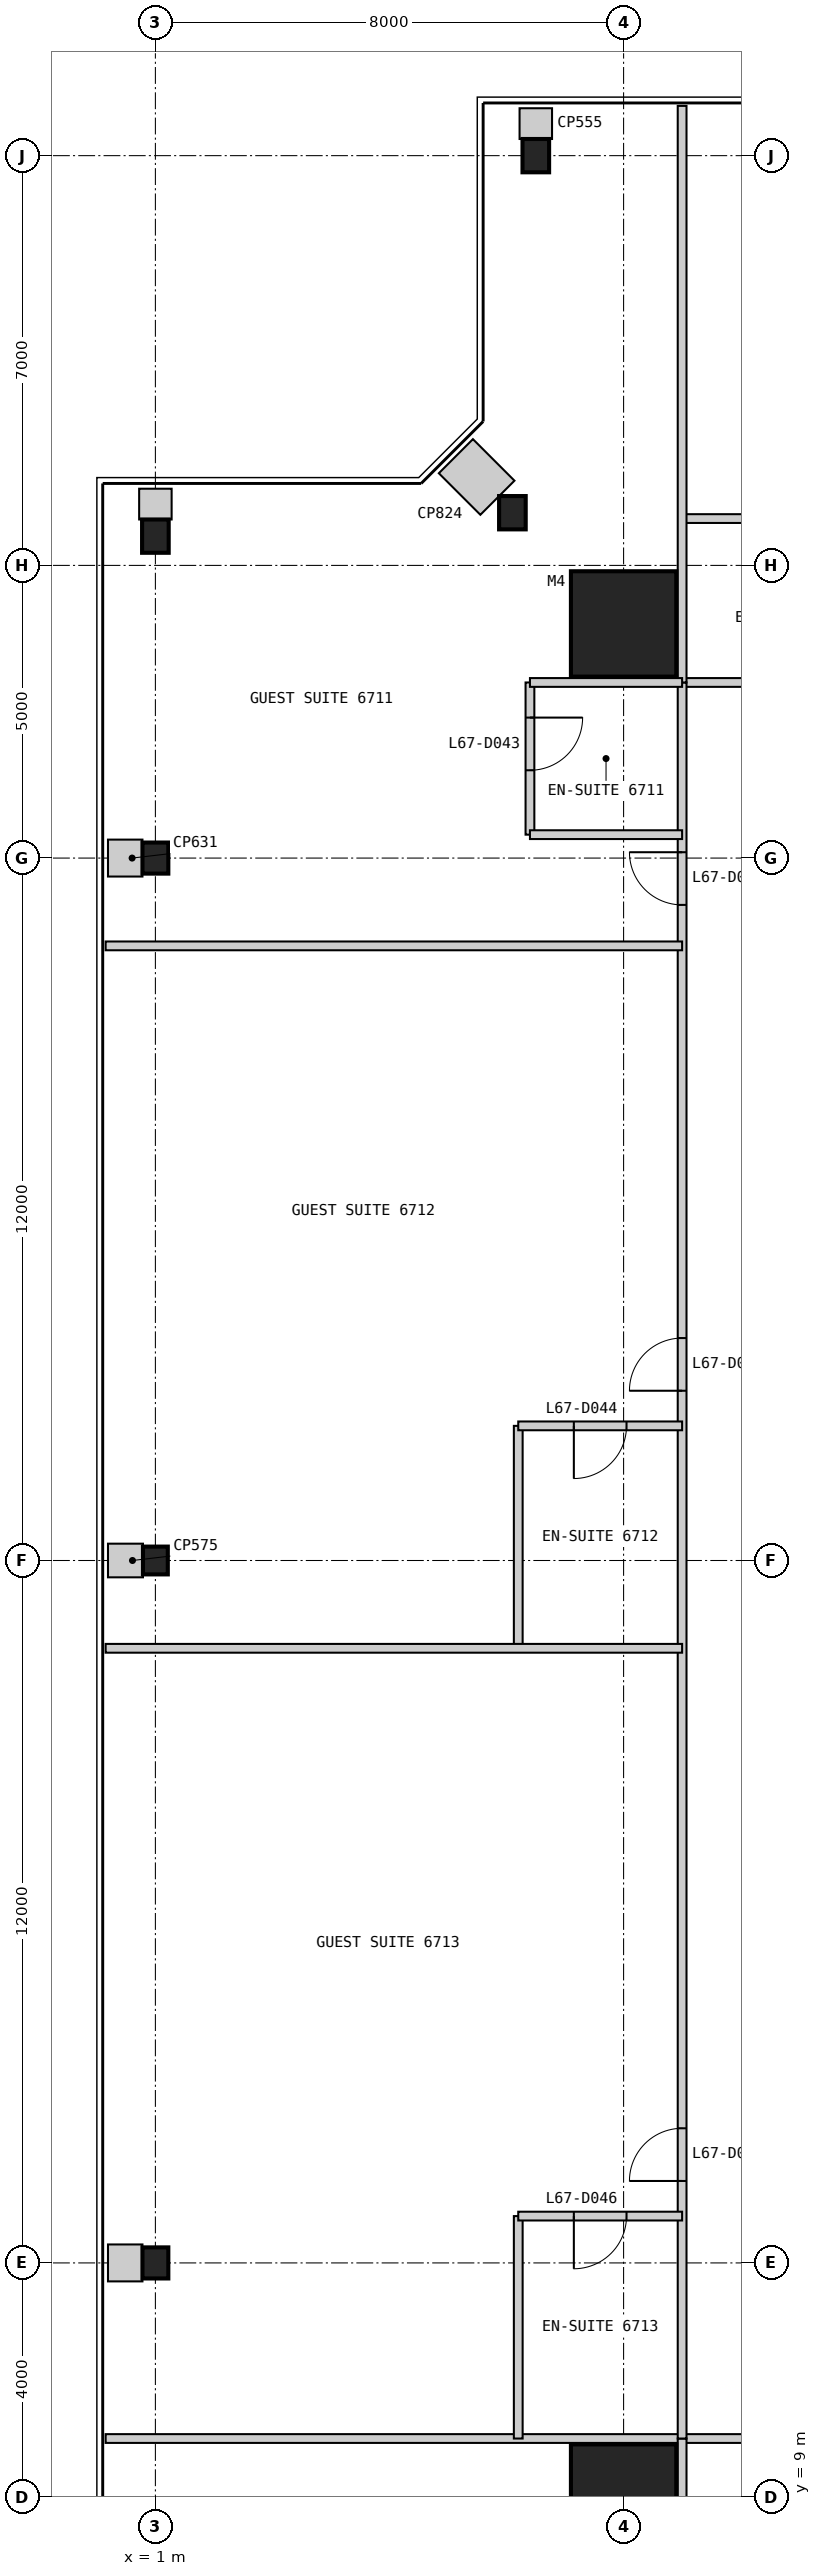
"""IFC4 building model, lengths in metres.
Left out: names, types, materials, properties, quantities, classifications, styles, units other than length and angle.
Written with IfcOpenShell. Run it as: python <this file> out.ifc"""

import sys

from ifc_helpers import new_model, si_unit, direction, frame, frame_2d, origin, origin_2d, place, context, subcontext, project, spatial, rectangle, i_section, extrude, element, fill, save


model = new_model("IFC4")
c1 = context("Model", 3, precision=1e-05, world=origin(), true_north=direction((0.0, 1.0)))
c2 = subcontext(c1, "Body", "Model", "MODEL_VIEW")
j1 = project(units=[si_unit("LENGTHUNIT", "METRE"), si_unit("PLANEANGLEUNIT", "RADIAN")], contexts=[c1])
p1 = place(None, origin())
s1 = spatial("IfcSite", under=j1, at=p1, CompositionType="ELEMENT")
p2 = place(p1, origin())
s2 = spatial("IfcBuilding", under=s1, at=p2, CompositionType="ELEMENT")
p3 = place(p2, frame((0.0, 0.0, 279.8)))
s3 = spatial("IfcBuildingStorey", under=s2, at=p3, CompositionType="ELEMENT", Elevation=279.8)
for number, where, z_axis, x_axis in (
    (1, (9.0, 9.0, 0.0), (0.0, 0.0, 1.0), (1.0, 0.0, 0.0)),
    (2, (9.0, 41.0, 0.0), (0.0, 0.0, 1.0), (1.0, 0.0, 0.0)),
):
    element("IfcColumn", number, at=place(p3, frame(where, z_axis=z_axis, x_axis=x_axis)), inside=s3, PredefinedType="COLUMN", context=c2, shape_type="SweptSolid", body=[
        extrude(rectangle(XDim=1.8, YDim=1.8, at=origin_2d()), origin(), (0.0, 0.0, 1.0), 3.4),
    ])
for number, where, z_axis, x_axis in (
    (3, (7.5, 49.0, 0.0), (0.0, 0.0, 1.0), (1.0, 0.0, 0.0)),
    (4, (7.1, 42.9, 0.0), (0.0, 0.0, 1.0), (1.0, 0.0, 0.0)),
    (5, (1.0, 42.5, 0.0), (0.0, 0.0, 1.0), (1.0, 0.0, 0.0)),
):
    element("IfcColumn", number, at=place(p3, frame(where, z_axis=z_axis, x_axis=x_axis)), inside=s3, PredefinedType="COLUMN", context=c2, shape_type="SweptSolid", body=[
        extrude(i_section(OverallWidth=0.455, OverallDepth=0.569, WebThickness=0.078, FlangeThickness=0.125, at=origin_2d()), origin(), (0.0, 0.0, 1.0), 3.4),
    ])
p4 = place(p3, frame((1.0, 37.0, 0.0), z_axis=(0.0, 0.0, 1.0), x_axis=(1.0, 0.0, 0.0)))
e6 = element("IfcColumn", 6, at=p4, inside=s3, PredefinedType="COLUMN", context=c2, shape_type="SweptSolid", body=[
    extrude(i_section(OverallWidth=0.442, OverallDepth=0.531, WebThickness=0.066, FlangeThickness=0.106, at=origin_2d()), origin(), (0.0, 0.0, 1.0), 3.4),
])
p5 = place(p3, frame((1.0, 25.0, 0.0), z_axis=(0.0, 0.0, 1.0), x_axis=(1.0, 0.0, 0.0)))
e7 = element("IfcColumn", 7, at=p5, inside=s3, PredefinedType="COLUMN", context=c2, shape_type="SweptSolid", body=[
    extrude(i_section(OverallWidth=0.424, OverallDepth=0.475, WebThickness=0.048, FlangeThickness=0.077, at=origin_2d()), origin(), (0.0, 0.0, 1.0), 3.4),
])
p6 = place(p3, frame((1.0, 13.0, 0.0), z_axis=(0.0, 0.0, 1.0), x_axis=(1.0, 0.0, 0.0)))
e8 = element("IfcColumn", 8, at=p6, inside=s3, PredefinedType="COLUMN", context=c2, shape_type="SweptSolid", body=[
    extrude(i_section(OverallWidth=0.442, OverallDepth=0.531, WebThickness=0.066, FlangeThickness=0.106, at=origin_2d()), origin(), (0.0, 0.0, 1.0), 3.4),
])
p7 = place(p3, frame((10.0, 10.0, 0.0), z_axis=(0.0, 0.0, 1.0), x_axis=(1.0, 0.0, 0.0)))
e9 = element("IfcWall", 9, at=p7, inside=s3, PredefinedType="PARTITIONING", context=c2, shape_type="SweptSolid", body=[
    extrude(rectangle(XDim=30.0, YDim=0.15, at=frame_2d((15.0, 0.0))), origin(), (0.0, 0.0, 1.0), 3.25),
])
p8 = place(p7, frame((2.9, 0.0, 0.0)))
e10 = element("IfcOpeningElement", 10, at=p8, cuts=e9, PredefinedType="OPENING", context=c2, shape_type="SweptSolid", body=[
    extrude(rectangle(XDim=0.9, YDim=2.1, at=frame_2d((0.45, 1.05))), frame((0.0, 0.085, 0.0), z_axis=(0.0, -1.0, 0.0), x_axis=(1.0, 0.0, 0.0)), (0.0, 0.0, 1.0), 0.17),
])
p9 = place(p7, frame((11.2, 0.0, 0.0)))
e11 = element("IfcOpeningElement", 11, at=p9, cuts=e9, PredefinedType="OPENING", context=c2, shape_type="SweptSolid", body=[
    extrude(rectangle(XDim=0.9, YDim=2.1, at=frame_2d((0.45, 1.05))), frame((0.0, 0.085, 0.0), z_axis=(0.0, -1.0, 0.0), x_axis=(1.0, 0.0, 0.0)), (0.0, 0.0, 1.0), 0.17),
])
p10 = place(p7, frame((17.6, 0.0, 0.0)))
e12 = element("IfcOpeningElement", 12, at=p10, cuts=e9, PredefinedType="OPENING", context=c2, shape_type="SweptSolid", body=[
    extrude(rectangle(XDim=0.9, YDim=2.1, at=frame_2d((0.45, 1.05))), frame((0.0, 0.085, 0.0), z_axis=(0.0, -1.0, 0.0), x_axis=(1.0, 0.0, 0.0)), (0.0, 0.0, 1.0), 0.17),
])
p11 = place(p7, frame((26.3, 0.0, 0.0)))
e13 = element("IfcOpeningElement", 13, at=p11, cuts=e9, PredefinedType="OPENING", context=c2, shape_type="SweptSolid", body=[
    extrude(rectangle(XDim=1.0, YDim=2.1, at=frame_2d((0.5, 1.05))), frame((0.0, 0.085, 0.0), z_axis=(0.0, -1.0, 0.0), x_axis=(1.0, 0.0, 0.0)), (0.0, 0.0, 1.0), 0.17),
])
p12 = place(p3, frame((0.15, 10.0, 0.0), z_axis=(0.0, 0.0, 1.0), x_axis=(1.0, 0.0, 0.0)))
e14 = element("IfcWall", 14, at=p12, inside=s3, PredefinedType="PARTITIONING", context=c2, shape_type="SweptSolid", body=[
    extrude(rectangle(XDim=9.85, YDim=0.15, at=frame_2d((4.925, 0.0))), origin(), (0.0, 0.0, 1.0), 3.25),
])
p13 = place(p3, frame((10.0, 7.4, 0.0), z_axis=(0.0, 0.0, 1.0), x_axis=(0.0, 1.0, 0.0)))
e15 = element("IfcWall", 15, at=p13, inside=s3, PredefinedType="PARTITIONING", context=c2, shape_type="SweptSolid", body=[
    extrude(rectangle(XDim=2.6, YDim=0.15, at=frame_2d((1.3, 0.0))), origin(), (0.0, 0.0, 1.0), 3.25),
])
p14 = place(p3, frame((40.0, 40.0, 0.0), z_axis=(0.0, 0.0, 1.0), x_axis=(-1.0, 0.0, 0.0)))
e16 = element("IfcWall", 16, at=p14, inside=s3, PredefinedType="PARTITIONING", context=c2, shape_type="SweptSolid", body=[
    extrude(rectangle(XDim=30.0, YDim=0.15, at=frame_2d((15.0, 0.0))), origin(), (0.0, 0.0, 1.0), 3.25),
])
p15 = place(p14, frame((2.9, 0.0, 0.0)))
e17 = element("IfcOpeningElement", 17, at=p15, cuts=e16, PredefinedType="OPENING", context=c2, shape_type="SweptSolid", body=[
    extrude(rectangle(XDim=0.9, YDim=2.1, at=frame_2d((0.45, 1.05))), frame((0.0, 0.085, 0.0), z_axis=(0.0, -1.0, 0.0), x_axis=(1.0, 0.0, 0.0)), (0.0, 0.0, 1.0), 0.17),
])
p16 = place(p14, frame((11.2, 0.0, 0.0)))
e18 = element("IfcOpeningElement", 18, at=p16, cuts=e16, PredefinedType="OPENING", context=c2, shape_type="SweptSolid", body=[
    extrude(rectangle(XDim=0.9, YDim=2.1, at=frame_2d((0.45, 1.05))), frame((0.0, 0.085, 0.0), z_axis=(0.0, -1.0, 0.0), x_axis=(1.0, 0.0, 0.0)), (0.0, 0.0, 1.0), 0.17),
])
p17 = place(p14, frame((24.7, 0.0, 0.0)))
e19 = element("IfcOpeningElement", 19, at=p17, cuts=e16, PredefinedType="OPENING", context=c2, shape_type="SweptSolid", body=[
    extrude(rectangle(XDim=0.9, YDim=2.1, at=frame_2d((0.45, 1.05))), frame((0.0, 0.085, 0.0), z_axis=(0.0, -1.0, 0.0), x_axis=(1.0, 0.0, 0.0)), (0.0, 0.0, 1.0), 0.17),
])
p18 = place(p3, frame((13.8, 42.8, 0.0), z_axis=(0.0, 0.0, 1.0), x_axis=(-1.0, 0.0, 0.0)))
e20 = element("IfcWall", 20, at=p18, inside=s3, PredefinedType="PARTITIONING", context=c2, shape_type="SweptSolid", body=[
    extrude(rectangle(XDim=3.8, YDim=0.15, at=frame_2d((1.9, 0.0))), origin(), (0.0, 0.0, 1.0), 3.25),
])
p19 = place(p3, frame((10.0, 40.0, 0.0), z_axis=(0.0, 0.0, 1.0), x_axis=(0.0, -1.0, 0.0)))
e21 = element("IfcWall", 21, at=p19, inside=s3, PredefinedType="PARTITIONING", context=c2, shape_type="SweptSolid", body=[
    extrude(rectangle(XDim=30.0, YDim=0.15, at=frame_2d((15.0, 0.0))), origin(), (0.0, 0.0, 1.0), 2.638),
])
p20 = place(p19, frame((2.9, 0.0, 0.0)))
e22 = element("IfcOpeningElement", 22, at=p20, cuts=e21, PredefinedType="OPENING", context=c2, shape_type="SweptSolid", body=[
    extrude(rectangle(XDim=0.9, YDim=2.1, at=frame_2d((0.45, 1.05))), frame((0.0, 0.085, 0.0), z_axis=(0.0, -1.0, 0.0), x_axis=(1.0, 0.0, 0.0)), (0.0, 0.0, 1.0), 0.17),
])
p21 = place(p19, frame((11.2, 0.0, 0.0)))
e23 = element("IfcOpeningElement", 23, at=p21, cuts=e21, PredefinedType="OPENING", context=c2, shape_type="SweptSolid", body=[
    extrude(rectangle(XDim=0.9, YDim=2.1, at=frame_2d((0.45, 1.05))), frame((0.0, 0.085, 0.0), z_axis=(0.0, -1.0, 0.0), x_axis=(1.0, 0.0, 0.0)), (0.0, 0.0, 1.0), 0.17),
])
p22 = place(p19, frame((24.7, 0.0, 0.0)))
e24 = element("IfcOpeningElement", 24, at=p22, cuts=e21, PredefinedType="OPENING", context=c2, shape_type="SweptSolid", body=[
    extrude(rectangle(XDim=0.9, YDim=2.1, at=frame_2d((0.45, 1.05))), frame((0.0, 0.085, 0.0), z_axis=(0.0, -1.0, 0.0), x_axis=(1.0, 0.0, 0.0)), (0.0, 0.0, 1.0), 0.17),
])
p23 = place(p3, frame((10.0, 49.85, 0.0), z_axis=(0.0, 0.0, 1.0), x_axis=(0.0, -1.0, 0.0)))
e25 = element("IfcWall", 25, at=p23, inside=s3, PredefinedType="PARTITIONING", context=c2, shape_type="SweptSolid", body=[
    extrude(rectangle(XDim=9.85, YDim=0.15, at=frame_2d((4.925, 0.0))), origin(), (0.0, 0.0, 1.0), 3.25),
])
p24 = place(p3, frame((7.4, 40.0, 0.0), z_axis=(0.0, 0.0, 1.0), x_axis=(0.0, -1.0, 0.0)))
e26 = element("IfcWall", 26, at=p24, inside=s3, PredefinedType="PARTITIONING", context=c2, shape_type="SweptSolid", body=[
    extrude(rectangle(XDim=2.6, YDim=0.15, at=frame_2d((1.3, 0.0))), origin(), (0.0, 0.0, 1.0), 3.25),
])
p25 = place(p24, frame((0.6, 0.0, 0.0)))
e27 = element("IfcOpeningElement", 27, at=p25, cuts=e26, PredefinedType="OPENING", context=c2, shape_type="SweptSolid", body=[
    extrude(rectangle(XDim=0.9, YDim=2.1, at=frame_2d((0.45, 1.05))), frame((0.0, 0.085, 0.0), z_axis=(0.0, -1.0, 0.0), x_axis=(1.0, 0.0, 0.0)), (0.0, 0.0, 1.0), 0.17),
])
for number, where, z_axis, x_axis in (
    (28, (7.4, 40.0, 0.0), (0.0, 0.0, 1.0), (1.0, 0.0, 0.0)),
    (29, (7.4, 37.4, 0.0), (0.0, 0.0, 1.0), (1.0, 0.0, 0.0)),
):
    element("IfcWall", number, at=place(p3, frame(where, z_axis=z_axis, x_axis=x_axis)), inside=s3, PredefinedType="PARTITIONING", context=c2, shape_type="SweptSolid", body=[
        extrude(rectangle(XDim=2.6, YDim=0.15, at=frame_2d((1.3, 0.0))), origin(), (0.0, 0.0, 1.0), 3.25),
    ])
p26 = place(p3, frame((0.15, 35.5, 0.0), z_axis=(0.0, 0.0, 1.0), x_axis=(1.0, 0.0, 0.0)))
e30 = element("IfcWall", 30, at=p26, inside=s3, PredefinedType="PARTITIONING", context=c2, shape_type="SweptSolid", body=[
    extrude(rectangle(XDim=9.85, YDim=0.15, at=frame_2d((4.925, 0.0))), origin(), (0.0, 0.0, 1.0), 3.25),
])
p27 = place(p3, frame((7.2, 27.3, 0.0), z_axis=(0.0, 0.0, 1.0), x_axis=(0.0, -1.0, 0.0)))
e31 = element("IfcWall", 31, at=p27, inside=s3, PredefinedType="PARTITIONING", context=c2, shape_type="SweptSolid", body=[
    extrude(rectangle(XDim=3.8, YDim=0.15, at=frame_2d((1.9, 0.0))), origin(), (0.0, 0.0, 1.0), 3.25),
])
p28 = place(p3, frame((7.2, 27.3, 0.0), z_axis=(0.0, 0.0, 1.0), x_axis=(1.0, 0.0, 0.0)))
e32 = element("IfcWall", 32, at=p28, inside=s3, PredefinedType="PARTITIONING", context=c2, shape_type="SweptSolid", body=[
    extrude(rectangle(XDim=2.8, YDim=0.15, at=frame_2d((1.4, 0.0))), origin(), (0.0, 0.0, 1.0), 3.25),
])
p29 = place(p28, frame((0.95, 0.0, 0.0)))
e33 = element("IfcOpeningElement", 33, at=p29, cuts=e32, PredefinedType="OPENING", context=c2, shape_type="SweptSolid", body=[
    extrude(rectangle(XDim=0.9, YDim=2.1, at=frame_2d((0.45, 1.05))), frame((0.0, 0.085, 0.0), z_axis=(0.0, -1.0, 0.0), x_axis=(1.0, 0.0, 0.0)), (0.0, 0.0, 1.0), 0.17),
])
p30 = place(p3, frame((0.15, 23.5, 0.0), z_axis=(0.0, 0.0, 1.0), x_axis=(1.0, 0.0, 0.0)))
e34 = element("IfcWall", 34, at=p30, inside=s3, PredefinedType="PARTITIONING", context=c2, shape_type="SweptSolid", body=[
    extrude(rectangle(XDim=9.85, YDim=0.15, at=frame_2d((4.925, 0.0))), origin(), (0.0, 0.0, 1.0), 3.25),
])
p31 = place(p3, frame((7.2, 13.8, 0.0), z_axis=(0.0, 0.0, 1.0), x_axis=(0.0, -1.0, 0.0)))
e35 = element("IfcWall", 35, at=p31, inside=s3, PredefinedType="PARTITIONING", context=c2, shape_type="SweptSolid", body=[
    extrude(rectangle(XDim=3.8, YDim=0.15, at=frame_2d((1.9, 0.0))), origin(), (0.0, 0.0, 1.0), 3.25),
])
p32 = place(p3, frame((7.2, 13.8, 0.0), z_axis=(0.0, 0.0, 1.0), x_axis=(1.0, 0.0, 0.0)))
e36 = element("IfcWall", 36, at=p32, inside=s3, PredefinedType="PARTITIONING", context=c2, shape_type="SweptSolid", body=[
    extrude(rectangle(XDim=2.8, YDim=0.15, at=frame_2d((1.4, 0.0))), origin(), (0.0, 0.0, 1.0), 3.25),
])
p33 = place(p32, frame((0.95, 0.0, 0.0)))
e37 = element("IfcOpeningElement", 37, at=p33, cuts=e36, PredefinedType="OPENING", context=c2, shape_type="SweptSolid", body=[
    extrude(rectangle(XDim=0.9, YDim=2.1, at=frame_2d((0.45, 1.05))), frame((0.0, 0.085, 0.0), z_axis=(0.0, -1.0, 0.0), x_axis=(1.0, 0.0, 0.0)), (0.0, 0.0, 1.0), 0.17),
])
p34 = place(p3, frame((7.5, 49.81, 0.0), z_axis=(0.0, 0.0, 1.0), x_axis=(0.0, -1.0, 0.0)))
e38 = element("IfcWall", 38, at=p34, inside=s3, PredefinedType="PARTITIONING", context=c2, shape_type="SweptSolid", body=[
    extrude(rectangle(XDim=0.526, YDim=0.555, at=frame_2d((0.263, 0.0))), origin(), (0.0, 0.0, 1.0), 3.25),
])
p35 = place(p3, frame((6.134, 43.866, 0.0), z_axis=(0.0, 0.0, 1.0), x_axis=(0.707106781187, -0.707106781187, 0.0)))
e39 = element("IfcWall", 39, at=p35, inside=s3, PredefinedType="PARTITIONING", context=c2, shape_type="SweptSolid", body=[
    extrude(rectangle(XDim=1.004, YDim=0.824, at=frame_2d((0.502, 0.0))), origin(), (0.0, 0.0, 1.0), 3.25),
])
p36 = place(p3, frame((1.0, 43.31, 0.0), z_axis=(0.0, 0.0, 1.0), x_axis=(0.0, -1.0, 0.0)))
e40 = element("IfcWall", 40, at=p36, inside=s3, PredefinedType="PARTITIONING", context=c2, shape_type="SweptSolid", body=[
    extrude(rectangle(XDim=0.526, YDim=0.555, at=frame_2d((0.263, 0.0))), origin(), (0.0, 0.0, 1.0), 3.25),
])
p37 = place(p3, frame((0.19, 37.0, 0.0), z_axis=(0.0, 0.0, 1.0), x_axis=(1.0, 0.0, 0.0)))
e41 = element("IfcWall", 41, at=p37, inside=s3, PredefinedType="PARTITIONING", context=c2, shape_type="SweptSolid", body=[
    extrude(rectangle(XDim=0.589, YDim=0.631, at=frame_2d((0.294, 0.0))), origin(), (0.0, 0.0, 1.0), 3.25),
])
p38 = place(p3, frame((0.19, 25.0, 0.0), z_axis=(0.0, 0.0, 1.0), x_axis=(1.0, 0.0, 0.0)))
e42 = element("IfcWall", 42, at=p38, inside=s3, PredefinedType="PARTITIONING", context=c2, shape_type="SweptSolid", body=[
    extrude(rectangle(XDim=0.598, YDim=0.575, at=frame_2d((0.299, 0.0))), origin(), (0.0, 0.0, 1.0), 3.25),
])
p39 = place(p3, frame((0.19, 13.0, 0.0), z_axis=(0.0, 0.0, 1.0), x_axis=(1.0, 0.0, 0.0)))
e43 = element("IfcWall", 43, at=p39, inside=s3, PredefinedType="PARTITIONING", context=c2, shape_type="SweptSolid", body=[
    extrude(rectangle(XDim=0.589, YDim=0.631, at=frame_2d((0.294, 0.0))), origin(), (0.0, 0.0, 1.0), 3.25),
])
p40 = place(p20, frame((0.9, 0.0, 0.0), z_axis=(0.0, 0.0, 1.0), x_axis=(-1.0, 0.0, 0.0)))
e44 = element("IfcDoor", 44, at=p40, inside=s3, OperationType="SINGLE_SWING_RIGHT", PredefinedType="DOOR", context=c2, shape_type="SweptSolid", body=[
    extrude(rectangle(XDim=0.9, YDim=2.1, at=frame_2d((0.45, 1.05))), frame((0.0, 0.025, 0.0), z_axis=(0.0, -1.0, 0.0), x_axis=(1.0, 0.0, 0.0)), (0.0, 0.0, 1.0), 0.05),
])
fill(e22, e44)
p41 = place(p25, origin())
e45 = element("IfcDoor", 45, at=p41, inside=s3, OperationType="SINGLE_SWING_LEFT", PredefinedType="DOOR", context=c2, shape_type="SweptSolid", body=[
    extrude(rectangle(XDim=0.9, YDim=2.1, at=frame_2d((0.45, 1.05))), frame((0.0, 0.025, 0.0), z_axis=(0.0, -1.0, 0.0), x_axis=(1.0, 0.0, 0.0)), (0.0, 0.0, 1.0), 0.05),
])
fill(e27, e45)
p42 = place(p29, frame((0.9, 0.0, 0.0), z_axis=(0.0, 0.0, 1.0), x_axis=(-1.0, 0.0, 0.0)))
e46 = element("IfcDoor", 46, at=p42, inside=s3, OperationType="SINGLE_SWING_RIGHT", PredefinedType="DOOR", context=c2, shape_type="SweptSolid", body=[
    extrude(rectangle(XDim=0.9, YDim=2.1, at=frame_2d((0.45, 1.05))), frame((0.0, 0.025, 0.0), z_axis=(0.0, -1.0, 0.0), x_axis=(1.0, 0.0, 0.0)), (0.0, 0.0, 1.0), 0.05),
])
fill(e33, e46)
p43 = place(p21, frame((0.9, 0.0, 0.0), z_axis=(0.0, 0.0, 1.0), x_axis=(-1.0, 0.0, 0.0)))
e47 = element("IfcDoor", 47, at=p43, inside=s3, OperationType="SINGLE_SWING_LEFT", PredefinedType="DOOR", context=c2, shape_type="SweptSolid", body=[
    extrude(rectangle(XDim=0.9, YDim=2.1, at=frame_2d((0.45, 1.05))), frame((0.0, 0.025, 0.0), z_axis=(0.0, -1.0, 0.0), x_axis=(1.0, 0.0, 0.0)), (0.0, 0.0, 1.0), 0.05),
])
fill(e23, e47)
p44 = place(p33, frame((0.9, 0.0, 0.0), z_axis=(0.0, 0.0, 1.0), x_axis=(-1.0, 0.0, 0.0)))
e48 = element("IfcDoor", 48, at=p44, inside=s3, OperationType="SINGLE_SWING_RIGHT", PredefinedType="DOOR", context=c2, shape_type="SweptSolid", body=[
    extrude(rectangle(XDim=0.9, YDim=2.1, at=frame_2d((0.45, 1.05))), frame((0.0, 0.025, 0.0), z_axis=(0.0, -1.0, 0.0), x_axis=(1.0, 0.0, 0.0)), (0.0, 0.0, 1.0), 0.05),
])
fill(e37, e48)
p45 = place(p22, frame((0.9, 0.0, 0.0), z_axis=(0.0, 0.0, 1.0), x_axis=(-1.0, 0.0, 0.0)))
e49 = element("IfcDoor", 49, at=p45, inside=s3, OperationType="SINGLE_SWING_LEFT", PredefinedType="DOOR", context=c2, shape_type="SweptSolid", body=[
    extrude(rectangle(XDim=0.9, YDim=2.1, at=frame_2d((0.45, 1.05))), frame((0.0, 0.025, 0.0), z_axis=(0.0, -1.0, 0.0), x_axis=(1.0, 0.0, 0.0)), (0.0, 0.0, 1.0), 0.05),
])
fill(e24, e49)
save(model, sys.argv[1])
